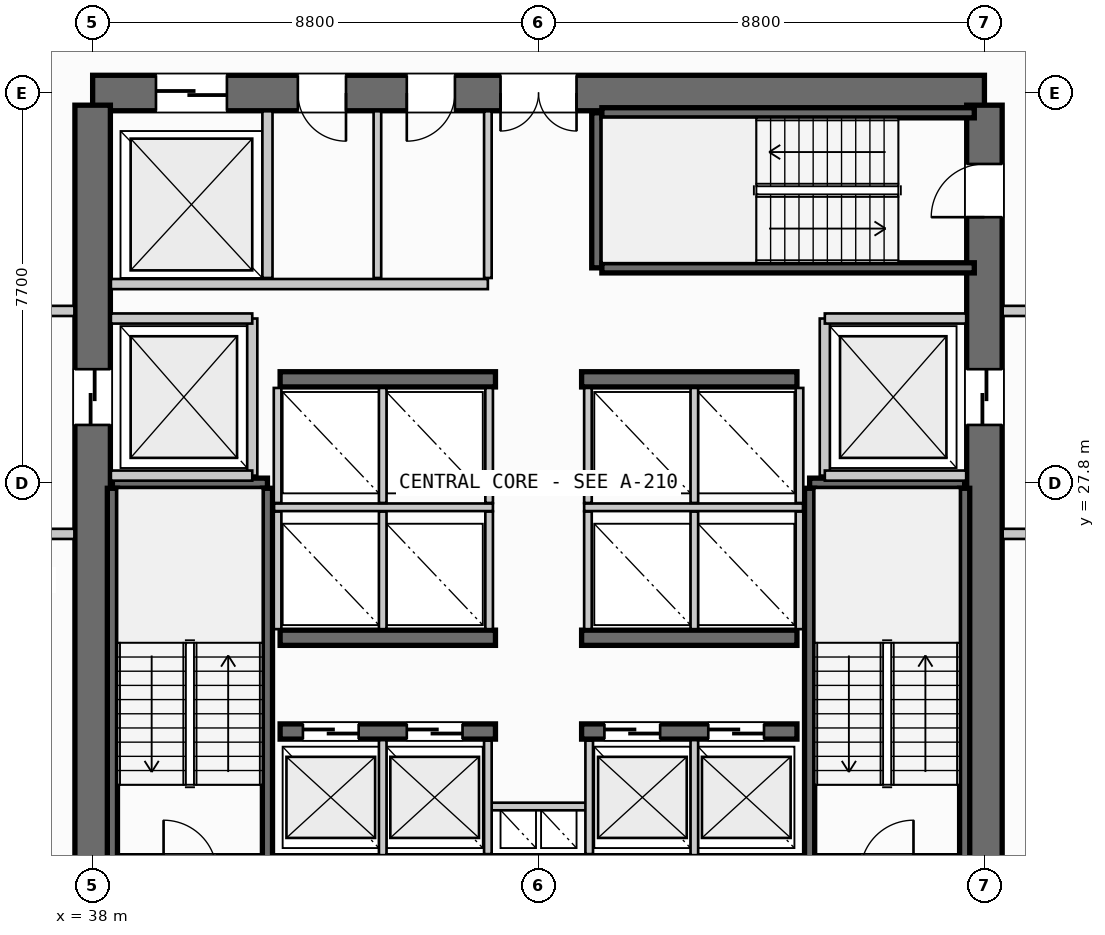
"""IFC4 building model, lengths in metres.
Left out: names, types, materials, properties, quantities, classifications, styles, units other than length and angle.
Written with IfcOpenShell. Run it as: python <this file> out.ifc"""

import sys

from ifc_helpers import new_model, si_unit, direction, frame, frame_2d, origin, place, context, subcontext, project, spatial, rectangle, extrude, source, transform, mapped, element, fill, save


model = new_model("IFC4")
c1 = context("Model", 3, precision=1e-05, world=origin(), true_north=direction((0.0, 1.0)))
c2 = subcontext(c1, "Body", "Model", "MODEL_VIEW")
j1 = project(units=[si_unit("LENGTHUNIT", "METRE"), si_unit("PLANEANGLEUNIT", "RADIAN")], contexts=[c1])
p1 = place(None, origin())
s1 = spatial("IfcSite", under=j1, at=p1, CompositionType="ELEMENT")
p2 = place(p1, origin())
s2 = spatial("IfcBuilding", under=s1, at=p2, CompositionType="ELEMENT")
p3 = place(p2, frame((0.0, 0.0, 71.4)))
s3 = spatial("IfcBuildingStorey", under=s2, at=p3, CompositionType="ELEMENT", Elevation=71.4)
p4 = place(p3, frame((38.0, 20.1, 0.0), z_axis=(0.0, 0.0, 1.0), x_axis=(1.0, 0.0, 0.0)))
e1 = element("IfcWall", 1, at=p4, inside=s3, PredefinedType="SHEAR", context=c2, shape_type="SweptSolid", body=[
    extrude(rectangle(XDim=17.6, YDim=0.7, at=frame_2d((8.8, 0.0))), origin(), (0.0, 0.0, 1.0), 3.54),
])
p5 = place(p4, frame((1.4, 0.0, 0.0)))
e2 = element("IfcOpeningElement", 2, at=p5, cuts=e1, PredefinedType="OPENING", context=c2, shape_type="SweptSolid", body=[
    extrude(rectangle(XDim=1.05, YDim=2.15, at=frame_2d((0.525, 1.075))), frame((0.0, 0.36, 0.0), z_axis=(0.0, -1.0, 0.0), x_axis=(1.0, 0.0, 0.0)), (0.0, 0.0, 1.0), 0.72),
])
p6 = place(p4, frame((15.15, 0.0, 0.0)))
e3 = element("IfcOpeningElement", 3, at=p6, cuts=e1, PredefinedType="OPENING", context=c2, shape_type="SweptSolid", body=[
    extrude(rectangle(XDim=1.05, YDim=2.15, at=frame_2d((0.525, 1.075))), frame((0.0, 0.36, 0.0), z_axis=(0.0, -1.0, 0.0), x_axis=(1.0, 0.0, 0.0)), (0.0, 0.0, 1.0), 0.72),
])
p7 = place(p3, frame((55.6, 35.5, 0.0), z_axis=(0.0, 0.0, 1.0), x_axis=(-1.0, 0.0, 0.0)))
e4 = element("IfcWall", 4, at=p7, inside=s3, PredefinedType="SHEAR", context=c2, shape_type="SweptSolid", body=[
    extrude(rectangle(XDim=17.6, YDim=0.7, at=frame_2d((8.8, 0.0))), origin(), (0.0, 0.0, 1.0), 3.54),
])
p8 = place(p7, frame((8.05, 0.0, 0.0)))
e5 = element("IfcOpeningElement", 5, at=p8, cuts=e4, PredefinedType="OPENING", context=c2, shape_type="SweptSolid", body=[
    extrude(rectangle(XDim=1.5, YDim=2.2, at=frame_2d((0.75, 1.1))), frame((0.0, 0.36, 0.0), z_axis=(0.0, -1.0, 0.0), x_axis=(1.0, 0.0, 0.0)), (0.0, 0.0, 1.0), 0.72),
])
p9 = place(p7, frame((14.95, 0.0, 0.0)))
e6 = element("IfcOpeningElement", 6, at=p9, cuts=e4, PredefinedType="OPENING", context=c2, shape_type="SweptSolid", body=[
    extrude(rectangle(XDim=1.4, YDim=2.3, at=frame_2d((0.7, 1.15))), frame((0.0, 0.36, 0.0), z_axis=(0.0, -1.0, 0.0), x_axis=(1.0, 0.0, 0.0)), (0.0, 0.0, 1.0), 0.72),
])
p10 = place(p7, frame((12.6, 0.0, 0.0)))
e7 = element("IfcOpeningElement", 7, at=p10, cuts=e4, PredefinedType="OPENING", context=c2, shape_type="SweptSolid", body=[
    extrude(rectangle(XDim=0.95, YDim=2.15, at=frame_2d((0.475, 1.075))), frame((0.0, 0.36, 0.0), z_axis=(0.0, -1.0, 0.0), x_axis=(1.0, 0.0, 0.0)), (0.0, 0.0, 1.0), 0.72),
])
p11 = place(p7, frame((10.45, 0.0, 0.0)))
e8 = element("IfcOpeningElement", 8, at=p11, cuts=e4, PredefinedType="OPENING", context=c2, shape_type="SweptSolid", body=[
    extrude(rectangle(XDim=0.95, YDim=2.15, at=frame_2d((0.475, 1.075))), frame((0.0, 0.36, 0.0), z_axis=(0.0, -1.0, 0.0), x_axis=(1.0, 0.0, 0.0)), (0.0, 0.0, 1.0), 0.72),
])
p12 = place(p3, frame((38.0, 35.26, 0.0), z_axis=(0.0, 0.0, 1.0), x_axis=(0.0, -1.0, 0.0)))
e9 = element("IfcWall", 9, at=p12, inside=s3, PredefinedType="SHEAR", context=c2, shape_type="SweptSolid", body=[
    extrude(rectangle(XDim=14.92, YDim=0.7, at=frame_2d((7.46, 0.0))), origin(), (0.0, 0.0, 1.0), 3.54),
])
p13 = place(p12, frame((5.21, 0.0, 0.0)))
e10 = element("IfcOpeningElement", 10, at=p13, cuts=e9, PredefinedType="OPENING", context=c2, shape_type="SweptSolid", body=[
    extrude(rectangle(XDim=1.1, YDim=2.2, at=frame_2d((0.55, 1.1))), frame((0.0, 0.36, 0.0), z_axis=(0.0, -1.0, 0.0), x_axis=(1.0, 0.0, 0.0)), (0.0, 0.0, 1.0), 0.72),
])
p14 = place(p3, frame((55.6, 20.34, 0.0), z_axis=(0.0, 0.0, 1.0), x_axis=(0.0, 1.0, 0.0)))
e11 = element("IfcWall", 11, at=p14, inside=s3, PredefinedType="SHEAR", context=c2, shape_type="SweptSolid", body=[
    extrude(rectangle(XDim=14.92, YDim=0.7, at=frame_2d((7.46, 0.0))), origin(), (0.0, 0.0, 1.0), 3.54),
])
p15 = place(p14, frame((12.71, 0.0, 0.0)))
e12 = element("IfcOpeningElement", 12, at=p15, cuts=e11, PredefinedType="OPENING", context=c2, shape_type="SweptSolid", body=[
    extrude(rectangle(XDim=1.05, YDim=2.15, at=frame_2d((0.525, 1.075))), frame((0.0, 0.36, 0.0), z_axis=(0.0, -1.0, 0.0), x_axis=(1.0, 0.0, 0.0)), (0.0, 0.0, 1.0), 0.72),
])
p16 = place(p14, frame((8.61, 0.0, 0.0)))
e13 = element("IfcOpeningElement", 13, at=p16, cuts=e11, PredefinedType="OPENING", context=c2, shape_type="SweptSolid", body=[
    extrude(rectangle(XDim=1.1, YDim=2.2, at=frame_2d((0.55, 1.1))), frame((0.0, 0.36, 0.0), z_axis=(0.0, -1.0, 0.0), x_axis=(1.0, 0.0, 0.0)), (0.0, 0.0, 1.0), 0.72),
])
p17 = place(p3, frame((41.7, 22.9, 0.0), z_axis=(0.0, 0.0, 1.0), x_axis=(1.0, 0.0, 0.0)))
e14 = element("IfcWall", 14, at=p17, inside=s3, PredefinedType="SHEAR", context=c2, shape_type="SweptSolid", body=[
    extrude(rectangle(XDim=4.25, YDim=0.3, at=frame_2d((2.125, 0.0))), origin(), (0.0, 0.0, 1.0), 3.54),
])
p18 = place(p17, frame((0.45, 0.0, 0.0)))
e15 = element("IfcOpeningElement", 15, at=p18, cuts=e14, PredefinedType="OPENING", context=c2, shape_type="SweptSolid", body=[
    extrude(rectangle(XDim=1.1, YDim=2.2, at=frame_2d((0.55, 1.1))), frame((0.0, 0.16, 0.0), z_axis=(0.0, -1.0, 0.0), x_axis=(1.0, 0.0, 0.0)), (0.0, 0.0, 1.0), 0.32),
])
p19 = place(p17, frame((2.5, 0.0, 0.0)))
e16 = element("IfcOpeningElement", 16, at=p19, cuts=e14, PredefinedType="OPENING", context=c2, shape_type="SweptSolid", body=[
    extrude(rectangle(XDim=1.1, YDim=2.2, at=frame_2d((0.55, 1.1))), frame((0.0, 0.16, 0.0), z_axis=(0.0, -1.0, 0.0), x_axis=(1.0, 0.0, 0.0)), (0.0, 0.0, 1.0), 0.32),
])
p20 = place(p3, frame((47.65, 22.9, 0.0), z_axis=(0.0, 0.0, 1.0), x_axis=(1.0, 0.0, 0.0)))
e17 = element("IfcWall", 17, at=p20, inside=s3, PredefinedType="SHEAR", context=c2, shape_type="SweptSolid", body=[
    extrude(rectangle(XDim=4.25, YDim=0.3, at=frame_2d((2.125, 0.0))), origin(), (0.0, 0.0, 1.0), 3.54),
])
p21 = place(p20, frame((0.45, 0.0, 0.0)))
e18 = element("IfcOpeningElement", 18, at=p21, cuts=e17, PredefinedType="OPENING", context=c2, shape_type="SweptSolid", body=[
    extrude(rectangle(XDim=1.1, YDim=2.2, at=frame_2d((0.55, 1.1))), frame((0.0, 0.16, 0.0), z_axis=(0.0, -1.0, 0.0), x_axis=(1.0, 0.0, 0.0)), (0.0, 0.0, 1.0), 0.32),
])
p22 = place(p20, frame((2.5, 0.0, 0.0)))
e19 = element("IfcOpeningElement", 19, at=p22, cuts=e17, PredefinedType="OPENING", context=c2, shape_type="SweptSolid", body=[
    extrude(rectangle(XDim=1.1, YDim=2.2, at=frame_2d((0.55, 1.1))), frame((0.0, 0.16, 0.0), z_axis=(0.0, -1.0, 0.0), x_axis=(1.0, 0.0, 0.0)), (0.0, 0.0, 1.0), 0.32),
])
for number, where, z_axis, x_axis in (
    (20, (41.7, 24.75, 0.0), (0.0, 0.0, 1.0), (1.0, 0.0, 0.0)),
    (21, (47.65, 24.75, 0.0), (0.0, 0.0, 1.0), (1.0, 0.0, 0.0)),
    (22, (41.7, 29.85, 0.0), (0.0, 0.0, 1.0), (1.0, 0.0, 0.0)),
    (23, (47.65, 29.85, 0.0), (0.0, 0.0, 1.0), (1.0, 0.0, 0.0)),
):
    element("IfcWall", number, at=place(p3, frame(where, z_axis=z_axis, x_axis=x_axis)), inside=s3, PredefinedType="SHEAR", context=c2, shape_type="SweptSolid", body=[
        extrude(rectangle(XDim=4.25, YDim=0.3, at=frame_2d((2.125, 0.0))), origin(), (0.0, 0.0, 1.0), 3.54),
    ])
p23 = place(p3, frame((38.39, 27.8, 0.0), z_axis=(0.0, 0.0, 1.0), x_axis=(1.0, 0.0, 0.0)))
e24 = element("IfcWall", 24, at=p23, inside=s3, PredefinedType="SHEAR", context=c2, shape_type="SweptSolid", body=[
    extrude(rectangle(XDim=3.06, YDim=0.2, at=frame_2d((1.53, 0.0))), origin(), (0.0, 0.0, 1.0), 3.54),
])
for number, where, z_axis, x_axis in (
    (25, (41.45, 27.7, 0.0), (0.0, 0.0, 1.0), (0.0, -1.0, 0.0)),
    (26, (38.39, 20.35, 0.0), (0.0, 0.0, 1.0), (0.0, 1.0, 0.0)),
):
    element("IfcWall", number, at=place(p3, frame(where, z_axis=z_axis, x_axis=x_axis)), inside=s3, PredefinedType="SHEAR", context=c2, shape_type="SweptSolid", body=[
        extrude(rectangle(XDim=7.35, YDim=0.2, at=frame_2d((3.675, 0.0))), origin(), (0.0, 0.0, 1.0), 3.54),
    ])
p24 = place(p3, frame((52.15, 27.8, 0.0), z_axis=(0.0, 0.0, 1.0), x_axis=(1.0, 0.0, 0.0)))
e27 = element("IfcWall", 27, at=p24, inside=s3, PredefinedType="SHEAR", context=c2, shape_type="SweptSolid", body=[
    extrude(rectangle(XDim=3.06, YDim=0.2, at=frame_2d((1.53, 0.0))), origin(), (0.0, 0.0, 1.0), 3.54),
])
for number, where, z_axis, x_axis in (
    (28, (55.21, 27.7, 0.0), (0.0, 0.0, 1.0), (0.0, -1.0, 0.0)),
    (29, (52.15, 20.35, 0.0), (0.0, 0.0, 1.0), (0.0, 1.0, 0.0)),
):
    element("IfcWall", number, at=place(p3, frame(where, z_axis=z_axis, x_axis=x_axis)), inside=s3, PredefinedType="SHEAR", context=c2, shape_type="SweptSolid", body=[
        extrude(rectangle(XDim=7.35, YDim=0.2, at=frame_2d((3.675, 0.0))), origin(), (0.0, 0.0, 1.0), 3.54),
    ])
p25 = place(p3, frame((47.95, 32.05, 0.0), z_axis=(0.0, 0.0, 1.0), x_axis=(0.0, 1.0, 0.0)))
e30 = element("IfcWall", 30, at=p25, inside=s3, PredefinedType="SHEAR", context=c2, shape_type="SweptSolid", body=[
    extrude(rectangle(XDim=3.06, YDim=0.2, at=frame_2d((1.53, 0.0))), origin(), (0.0, 0.0, 1.0), 3.54),
])
for number, where, z_axis, x_axis in (
    (31, (48.05, 35.11, 0.0), (0.0, 0.0, 1.0), (1.0, 0.0, 0.0)),
    (32, (55.4, 32.05, 0.0), (0.0, 0.0, 1.0), (-1.0, 0.0, 0.0)),
):
    element("IfcWall", number, at=place(p3, frame(where, z_axis=z_axis, x_axis=x_axis)), inside=s3, PredefinedType="SHEAR", context=c2, shape_type="SweptSolid", body=[
        extrude(rectangle(XDim=7.35, YDim=0.2, at=frame_2d((3.675, 0.0))), origin(), (0.0, 0.0, 1.0), 3.54),
    ])
p26 = place(p3, frame((45.8, 21.42, 0.0), z_axis=(0.0, 0.0, 1.0), x_axis=(1.0, 0.0, 0.0)))
e33 = element("IfcWall", 33, at=p26, inside=s3, PredefinedType="PARTITIONING", context=c2, shape_type="SweptSolid", body=[
    extrude(rectangle(XDim=2.0, YDim=0.15, at=frame_2d((1.0, 0.0))), origin(), (0.0, 0.0, 1.0), 2.495),
])
for number, where, z_axis, x_axis in (
    (34, (45.8, 20.48, 0.0), (0.0, 0.0, 1.0), (0.0, 1.0, 0.0)),
    (35, (47.8, 20.48, 0.0), (0.0, 0.0, 1.0), (0.0, 1.0, 0.0)),
):
    element("IfcWall", number, at=place(p3, frame(where, z_axis=z_axis, x_axis=x_axis)), inside=s3, PredefinedType="PARTITIONING", context=c2, shape_type="SweptSolid", body=[
        extrude(rectangle(XDim=2.24, YDim=0.15, at=frame_2d((1.12, 0.0))), origin(), (0.0, 0.0, 1.0), 2.495),
    ])
p27 = place(p3, frame((41.15, 27.95, 0.0), z_axis=(0.0, 0.0, 1.0), x_axis=(0.0, 1.0, 0.0)))
e36 = element("IfcWall", 36, at=p27, inside=s3, PredefinedType="PARTITIONING", context=c2, shape_type="SweptSolid", body=[
    extrude(rectangle(XDim=3.1, YDim=0.2, at=frame_2d((1.55, 0.0))), origin(), (0.0, 0.0, 1.0), 2.495),
])
for number, where, z_axis, x_axis in (
    (37, (38.36, 27.95, 0.0), (0.0, 0.0, 1.0), (1.0, 0.0, 0.0)),
    (38, (38.36, 31.05, 0.0), (0.0, 0.0, 1.0), (1.0, 0.0, 0.0)),
):
    element("IfcWall", number, at=place(p3, frame(where, z_axis=z_axis, x_axis=x_axis)), inside=s3, PredefinedType="PARTITIONING", context=c2, shape_type="SweptSolid", body=[
        extrude(rectangle(XDim=2.79, YDim=0.2, at=frame_2d((1.395, 0.0))), origin(), (0.0, 0.0, 1.0), 2.495),
    ])
for number, where, z_axis, x_axis in (
    (39, (34.5, 26.8, 0.0), (0.0, 0.0, 1.0), (1.0, 0.0, 0.0)),
    (40, (34.5, 31.2, 0.0), (0.0, 0.0, 1.0), (1.0, 0.0, 0.0)),
):
    element("IfcWall", number, at=place(p3, frame(where, z_axis=z_axis, x_axis=x_axis)), inside=s3, PredefinedType="PARTITIONING", context=c2, shape_type="SweptSolid", body=[
        extrude(rectangle(XDim=3.14, YDim=0.2, at=frame_2d((1.57, 0.0))), origin(), (0.0, 0.0, 1.0), 2.495),
    ])
p28 = place(p3, frame((52.45, 27.95, 0.0), z_axis=(0.0, 0.0, 1.0), x_axis=(0.0, 1.0, 0.0)))
e41 = element("IfcWall", 41, at=p28, inside=s3, PredefinedType="PARTITIONING", context=c2, shape_type="SweptSolid", body=[
    extrude(rectangle(XDim=3.1, YDim=0.2, at=frame_2d((1.55, 0.0))), origin(), (0.0, 0.0, 1.0), 2.495),
])
for number, where, z_axis, x_axis in (
    (42, (52.45, 27.95, 0.0), (0.0, 0.0, 1.0), (1.0, 0.0, 0.0)),
    (43, (52.45, 31.05, 0.0), (0.0, 0.0, 1.0), (1.0, 0.0, 0.0)),
):
    element("IfcWall", number, at=place(p3, frame(where, z_axis=z_axis, x_axis=x_axis)), inside=s3, PredefinedType="PARTITIONING", context=c2, shape_type="SweptSolid", body=[
        extrude(rectangle(XDim=2.79, YDim=0.2, at=frame_2d((1.395, 0.0))), origin(), (0.0, 0.0, 1.0), 2.495),
    ])
for number, where, z_axis, x_axis in (
    (44, (55.96, 26.8, 0.0), (0.0, 0.0, 1.0), (1.0, 0.0, 0.0)),
    (45, (55.96, 31.2, 0.0), (0.0, 0.0, 1.0), (1.0, 0.0, 0.0)),
):
    element("IfcWall", number, at=place(p3, frame(where, z_axis=z_axis, x_axis=x_axis)), inside=s3, PredefinedType="PARTITIONING", context=c2, shape_type="SweptSolid", body=[
        extrude(rectangle(XDim=3.14, YDim=0.2, at=frame_2d((1.57, 0.0))), origin(), (0.0, 0.0, 1.0), 2.495),
    ])
for number, where, z_axis, x_axis in (
    (46, (43.725, 20.46, 0.0), (0.0, 0.0, 1.0), (0.0, 1.0, 0.0)),
    (47, (49.875, 20.46, 0.0), (0.0, 0.0, 1.0), (0.0, 1.0, 0.0)),
):
    element("IfcWall", number, at=place(p3, frame(where, z_axis=z_axis, x_axis=x_axis)), inside=s3, PredefinedType="PARTITIONING", context=c2, shape_type="SweptSolid", body=[
        extrude(rectangle(XDim=2.27, YDim=0.15, at=frame_2d((1.135, 0.0))), origin(), (0.0, 0.0, 1.0), 2.495),
    ])
p29 = place(p3, frame((41.58, 27.325, 0.0), z_axis=(0.0, 0.0, 1.0), x_axis=(1.0, 0.0, 0.0)))
e48 = element("IfcWall", 48, at=p29, inside=s3, PredefinedType="PARTITIONING", context=c2, shape_type="SweptSolid", body=[
    extrude(rectangle(XDim=4.32, YDim=0.15, at=frame_2d((2.16, 0.0))), origin(), (0.0, 0.0, 1.0), 2.495),
])
p30 = place(p3, frame((47.7, 27.325, 0.0), z_axis=(0.0, 0.0, 1.0), x_axis=(1.0, 0.0, 0.0)))
e49 = element("IfcWall", 49, at=p30, inside=s3, PredefinedType="PARTITIONING", context=c2, shape_type="SweptSolid", body=[
    extrude(rectangle(XDim=4.32, YDim=0.15, at=frame_2d((2.16, 0.0))), origin(), (0.0, 0.0, 1.0), 2.495),
])
for number, where, z_axis, x_axis in (
    (50, (41.65, 24.92, 0.0), (0.0, 0.0, 1.0), (0.0, 1.0, 0.0)),
    (51, (43.725, 24.92, 0.0), (0.0, 0.0, 1.0), (0.0, 1.0, 0.0)),
    (52, (45.825, 24.92, 0.0), (0.0, 0.0, 1.0), (0.0, 1.0, 0.0)),
    (53, (47.775, 24.92, 0.0), (0.0, 0.0, 1.0), (0.0, 1.0, 0.0)),
    (54, (49.875, 24.92, 0.0), (0.0, 0.0, 1.0), (0.0, 1.0, 0.0)),
    (55, (51.95, 24.92, 0.0), (0.0, 0.0, 1.0), (0.0, 1.0, 0.0)),
):
    element("IfcWall", number, at=place(p3, frame(where, z_axis=z_axis, x_axis=x_axis)), inside=s3, PredefinedType="PARTITIONING", context=c2, shape_type="SweptSolid", body=[
        extrude(rectangle(XDim=2.32, YDim=0.15, at=frame_2d((1.16, 0.0))), origin(), (0.0, 0.0, 1.0), 2.495),
    ])
for number, where, z_axis, x_axis in (
    (56, (41.65, 27.41, 0.0), (0.0, 0.0, 1.0), (0.0, 1.0, 0.0)),
    (57, (43.725, 27.41, 0.0), (0.0, 0.0, 1.0), (0.0, 1.0, 0.0)),
    (58, (45.825, 27.41, 0.0), (0.0, 0.0, 1.0), (0.0, 1.0, 0.0)),
    (59, (47.775, 27.41, 0.0), (0.0, 0.0, 1.0), (0.0, 1.0, 0.0)),
    (60, (49.875, 27.41, 0.0), (0.0, 0.0, 1.0), (0.0, 1.0, 0.0)),
    (61, (51.95, 27.41, 0.0), (0.0, 0.0, 1.0), (0.0, 1.0, 0.0)),
):
    element("IfcWall", number, at=place(p3, frame(where, z_axis=z_axis, x_axis=x_axis)), inside=s3, PredefinedType="PARTITIONING", context=c2, shape_type="SweptSolid", body=[
        extrude(rectangle(XDim=2.27, YDim=0.15, at=frame_2d((1.135, 0.0))), origin(), (0.0, 0.0, 1.0), 2.495),
    ])
p31 = place(p3, frame((41.45, 31.85, 0.0), z_axis=(0.0, 0.0, 1.0), x_axis=(0.0, 1.0, 0.0)))
e62 = element("IfcWall", 62, at=p31, inside=s3, PredefinedType="PARTITIONING", context=c2, shape_type="SweptSolid", body=[
    extrude(rectangle(XDim=3.29, YDim=0.2, at=frame_2d((1.645, 0.0))), origin(), (0.0, 0.0, 1.0), 2.495),
])
p32 = place(p3, frame((38.36, 31.73, 0.0), z_axis=(0.0, 0.0, 1.0), x_axis=(1.0, 0.0, 0.0)))
e63 = element("IfcWall", 63, at=p32, inside=s3, PredefinedType="PARTITIONING", context=c2, shape_type="SweptSolid", body=[
    extrude(rectangle(XDim=7.44, YDim=0.2, at=frame_2d((3.72, 0.0))), origin(), (0.0, 0.0, 1.0), 2.495),
])
p33 = place(p3, frame((45.8, 31.85, 0.0), z_axis=(0.0, 0.0, 1.0), x_axis=(0.0, 1.0, 0.0)))
e64 = element("IfcWall", 64, at=p33, inside=s3, PredefinedType="PARTITIONING", context=c2, shape_type="SweptSolid", body=[
    extrude(rectangle(XDim=3.29, YDim=0.15, at=frame_2d((1.645, 0.0))), origin(), (0.0, 0.0, 1.0), 2.495),
])
p34 = place(p3, frame((43.62, 31.85, 0.0), z_axis=(0.0, 0.0, 1.0), x_axis=(0.0, 1.0, 0.0)))
e65 = element("IfcWall", 65, at=p34, inside=s3, PredefinedType="PLUMBINGWALL", context=c2, shape_type="SweptSolid", body=[
    extrude(rectangle(XDim=3.29, YDim=0.15, at=frame_2d((1.645, 0.0))), origin(), (0.0, 0.0, 1.0), 2.495),
])
m1 = source(origin(), c2, "Body", "SweptSolid", [
    extrude(rectangle(XDim=1.05, YDim=2.15, at=frame_2d((0.525, 1.075))), frame((0.0, 0.025, 0.0), z_axis=(0.0, -1.0, 0.0), x_axis=(1.0, 0.0, 0.0)), (0.0, 0.0, 1.0), 0.05),
])
p35 = place(p15, origin())
e66 = element("IfcDoor", 66, at=p35, inside=s3, OperationType="SINGLE_SWING_LEFT", PredefinedType="DOOR", context=c2, shape_type="MappedRepresentation", body=[
    mapped(m1, transform((0.0, 0.0, 0.0), scale=1.0)),
])
fill(e12, e66)
m2 = source(origin(), c2, "Body", "SweptSolid", [
    extrude(rectangle(XDim=1.5, YDim=2.2, at=frame_2d((0.75, 1.1))), frame((0.0, 0.025, 0.0), z_axis=(0.0, -1.0, 0.0), x_axis=(1.0, 0.0, 0.0)), (0.0, 0.0, 1.0), 0.05),
])
p36 = place(p8, origin())
e67 = element("IfcDoor", 67, at=p36, inside=s3, OperationType="DOUBLE_DOOR_SINGLE_SWING", PredefinedType="DOOR", context=c2, shape_type="MappedRepresentation", body=[
    mapped(m2, transform((0.0, 0.0, 0.0), scale=1.0)),
])
fill(e5, e67)
m3 = source(origin(), c2, "Body", "SweptSolid", [
    extrude(rectangle(XDim=1.1, YDim=2.2, at=frame_2d((0.55, 1.1))), frame((0.0, 0.025, 0.0), z_axis=(0.0, -1.0, 0.0), x_axis=(1.0, 0.0, 0.0)), (0.0, 0.0, 1.0), 0.05),
])
p37 = place(p13, origin())
e68 = element("IfcDoor", 68, at=p37, inside=s3, OperationType="SLIDING_TO_LEFT", PredefinedType="DOOR", context=c2, shape_type="MappedRepresentation", body=[
    mapped(m3, transform((0.0, 0.0, 0.0), scale=1.0)),
])
fill(e10, e68)
p38 = place(p16, origin())
e69 = element("IfcDoor", 69, at=p38, inside=s3, OperationType="SLIDING_TO_RIGHT", PredefinedType="DOOR", context=c2, shape_type="MappedRepresentation", body=[
    mapped(m3, transform((0.0, 0.0, 0.0), scale=1.0)),
])
fill(e13, e69)
p39 = place(p18, origin())
e70 = element("IfcDoor", 70, at=p39, inside=s3, OperationType="SLIDING_TO_LEFT", PredefinedType="DOOR", context=c2, shape_type="MappedRepresentation", body=[
    mapped(m3, transform((0.0, 0.0, 0.0), scale=1.0)),
])
fill(e15, e70)
p40 = place(p19, origin())
e71 = element("IfcDoor", 71, at=p40, inside=s3, OperationType="SLIDING_TO_LEFT", PredefinedType="DOOR", context=c2, shape_type="MappedRepresentation", body=[
    mapped(m3, transform((0.0, 0.0, 0.0), scale=1.0)),
])
fill(e16, e71)
p41 = place(p21, origin())
e72 = element("IfcDoor", 72, at=p41, inside=s3, OperationType="SLIDING_TO_LEFT", PredefinedType="DOOR", context=c2, shape_type="MappedRepresentation", body=[
    mapped(m3, transform((0.0, 0.0, 0.0), scale=1.0)),
])
fill(e18, e72)
p42 = place(p22, origin())
e73 = element("IfcDoor", 73, at=p42, inside=s3, OperationType="SLIDING_TO_LEFT", PredefinedType="DOOR", context=c2, shape_type="MappedRepresentation", body=[
    mapped(m3, transform((0.0, 0.0, 0.0), scale=1.0)),
])
fill(e19, e73)
m4 = source(origin(), c2, "Body", "SweptSolid", [
    extrude(rectangle(XDim=1.4, YDim=2.3, at=frame_2d((0.7, 1.15))), frame((0.0, 0.025, 0.0), z_axis=(0.0, -1.0, 0.0), x_axis=(1.0, 0.0, 0.0)), (0.0, 0.0, 1.0), 0.05),
])
p43 = place(p9, origin())
e74 = element("IfcDoor", 74, at=p43, inside=s3, OperationType="SLIDING_TO_RIGHT", PredefinedType="DOOR", context=c2, shape_type="MappedRepresentation", body=[
    mapped(m4, transform((0.0, 0.0, 0.0), scale=1.0)),
])
fill(e6, e74)
m5 = source(origin(), c2, "Body", "SweptSolid", [
    extrude(rectangle(XDim=0.95, YDim=2.15, at=frame_2d((0.475, 1.075))), frame((0.0, 0.025, 0.0), z_axis=(0.0, -1.0, 0.0), x_axis=(1.0, 0.0, 0.0)), (0.0, 0.0, 1.0), 0.05),
])
p44 = place(p10, origin())
e75 = element("IfcDoor", 75, at=p44, inside=s3, OperationType="SINGLE_SWING_LEFT", PredefinedType="DOOR", context=c2, shape_type="MappedRepresentation", body=[
    mapped(m5, transform((0.0, 0.0, 0.0), scale=1.0)),
])
fill(e7, e75)
p45 = place(p11, origin())
e76 = element("IfcDoor", 76, at=p45, inside=s3, OperationType="SINGLE_SWING_RIGHT", PredefinedType="DOOR", context=c2, shape_type="MappedRepresentation", body=[
    mapped(m5, transform((0.0, 0.0, 0.0), scale=1.0)),
])
fill(e8, e76)
save(model, sys.argv[1])
